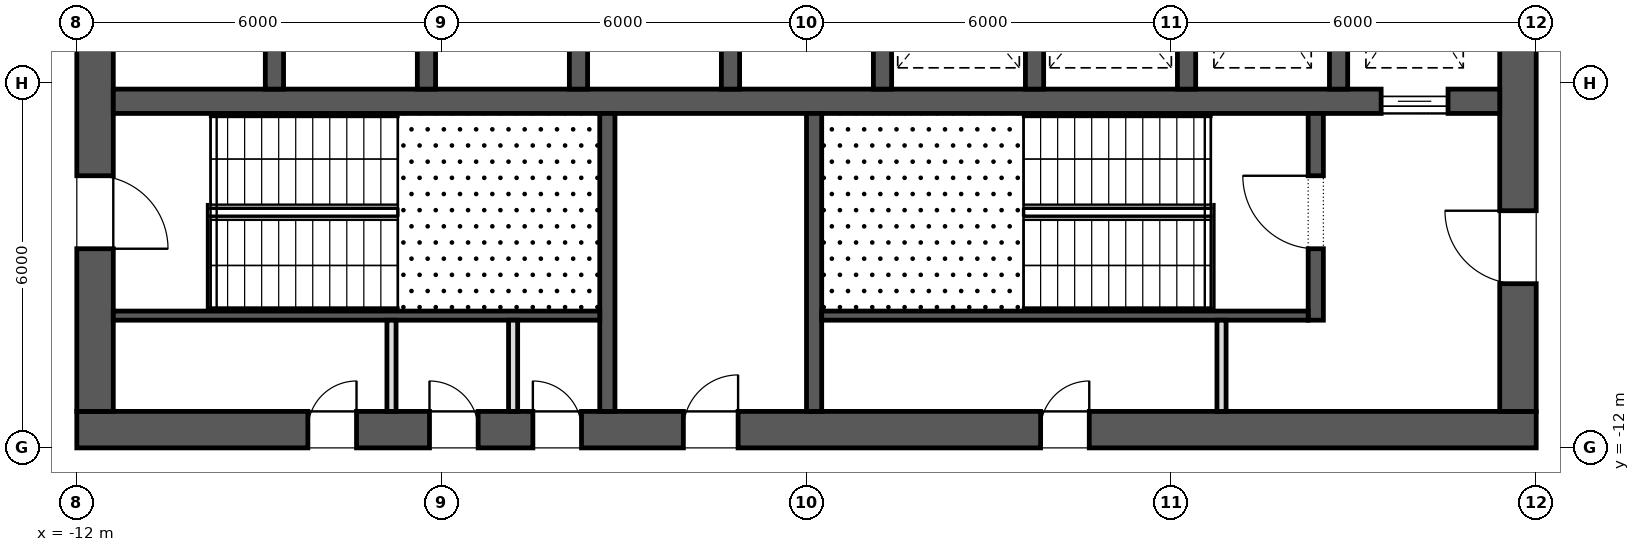
"""IFC4 building model, lengths in metres.
Left out: names, types, materials, properties, quantities, classifications, styles, units other than length and angle.
Written with IfcOpenShell. Run it as: python <this file> out.ifc"""

import sys

from ifc_helpers import new_model, si_unit, direction, frame, frame_2d, origin, place, context, subcontext, project, spatial, rectangle, extrude, element, fill, save


model = new_model("IFC4")
c1 = context("Model", 3, precision=1e-05, world=origin(), true_north=direction((0.0, 1.0)))
c2 = subcontext(c1, "Body", "Model", "MODEL_VIEW")
j1 = project(units=[si_unit("LENGTHUNIT", "METRE"), si_unit("PLANEANGLEUNIT", "RADIAN")], contexts=[c1])
p1 = place(None, origin())
s1 = spatial("IfcSite", under=j1, at=p1, CompositionType="ELEMENT")
p2 = place(p1, origin())
s2 = spatial("IfcBuilding", under=s1, at=p2, CompositionType="ELEMENT")
p3 = place(p2, frame((0.0, 0.0, 36.1)))
s3 = spatial("IfcBuildingStorey", under=s2, at=p3, CompositionType="ELEMENT", Elevation=36.1)
p4 = place(p3, frame((-12.0, -11.7, 0.0), z_axis=(0.0, 0.0, 1.0), x_axis=(1.0, 0.0, 0.0)))
e1 = element("IfcWall", 1, at=p4, inside=s3, PredefinedType="SHEAR", context=c2, shape_type="SweptSolid", body=[
    extrude(rectangle(XDim=24.0, YDim=0.6, at=frame_2d((12.0, 0.0))), origin(), (0.0, 0.0, 1.0), 4.2),
])
p5 = place(p4, frame((9.975, 0.0, 0.0)))
e2 = element("IfcOpeningElement", 2, at=p5, cuts=e1, PredefinedType="OPENING", context=c2, shape_type="SweptSolid", body=[
    extrude(rectangle(XDim=0.9, YDim=2.1, at=frame_2d((0.45, 1.05))), frame((0.0, 0.312, 0.0), z_axis=(0.0, -1.0, 0.0), x_axis=(1.0, 0.0, 0.0)), (0.0, 0.0, 1.0), 0.624),
])
p6 = place(p4, frame((3.8, 0.0, 0.0)))
e3 = element("IfcOpeningElement", 3, at=p6, cuts=e1, PredefinedType="OPENING", context=c2, shape_type="SweptSolid", body=[
    extrude(rectangle(XDim=0.8, YDim=2.1, at=frame_2d((0.4, 1.05))), frame((0.0, 0.312, 0.0), z_axis=(0.0, -1.0, 0.0), x_axis=(1.0, 0.0, 0.0)), (0.0, 0.0, 1.0), 0.624),
])
p7 = place(p4, frame((5.8, 0.0, 0.0)))
e4 = element("IfcOpeningElement", 4, at=p7, cuts=e1, PredefinedType="OPENING", context=c2, shape_type="SweptSolid", body=[
    extrude(rectangle(XDim=0.8, YDim=2.1, at=frame_2d((0.4, 1.05))), frame((0.0, 0.312, 0.0), z_axis=(0.0, -1.0, 0.0), x_axis=(1.0, 0.0, 0.0)), (0.0, 0.0, 1.0), 0.624),
])
p8 = place(p4, frame((7.5, 0.0, 0.0)))
e5 = element("IfcOpeningElement", 5, at=p8, cuts=e1, PredefinedType="OPENING", context=c2, shape_type="SweptSolid", body=[
    extrude(rectangle(XDim=0.8, YDim=2.1, at=frame_2d((0.4, 1.05))), frame((0.0, 0.312, 0.0), z_axis=(0.0, -1.0, 0.0), x_axis=(1.0, 0.0, 0.0)), (0.0, 0.0, 1.0), 0.624),
])
p9 = place(p4, frame((15.85, 0.0, 0.0)))
e6 = element("IfcOpeningElement", 6, at=p9, cuts=e1, PredefinedType="OPENING", context=c2, shape_type="SweptSolid", body=[
    extrude(rectangle(XDim=0.8, YDim=2.1, at=frame_2d((0.4, 1.05))), frame((0.0, 0.312, 0.0), z_axis=(0.0, -1.0, 0.0), x_axis=(1.0, 0.0, 0.0)), (0.0, 0.0, 1.0), 0.624),
])
p10 = place(p3, frame((11.7, -11.4, 0.0), z_axis=(0.0, 0.0, 1.0), x_axis=(0.0, 1.0, 0.0)))
e7 = element("IfcWall", 7, at=p10, inside=s3, PredefinedType="SHEAR", context=c2, shape_type="SweptSolid", body=[
    extrude(rectangle(XDim=22.8, YDim=0.6, at=frame_2d((11.4, 0.0))), origin(), (0.0, 0.0, 1.0), 4.2),
])
p11 = place(p10, frame((10.2, 0.0, 0.0)))
e8 = element("IfcOpeningElement", 8, at=p11, cuts=e7, PredefinedType="OPENING", context=c2, shape_type="SweptSolid", body=[
    extrude(rectangle(XDim=2.4, YDim=2.1, at=frame_2d((1.2, 1.05))), frame((0.0, 0.312, 0.0), z_axis=(0.0, -1.0, 0.0), x_axis=(1.0, 0.0, 0.0)), (0.0, 0.0, 1.0), 0.624),
])
p12 = place(p10, frame((19.5, 0.0, 0.0)))
e9 = element("IfcOpeningElement", 9, at=p12, cuts=e7, PredefinedType="OPENING", context=c2, shape_type="SweptSolid", body=[
    extrude(rectangle(XDim=1.2, YDim=2.1, at=frame_2d((0.6, 1.05))), frame((0.0, 0.312, 0.0), z_axis=(0.0, -1.0, 0.0), x_axis=(1.0, 0.0, 0.0)), (0.0, 0.0, 1.0), 0.624),
])
p13 = place(p10, frame((2.1, 0.0, 0.0)))
e10 = element("IfcOpeningElement", 10, at=p13, cuts=e7, PredefinedType="OPENING", context=c2, shape_type="SweptSolid", body=[
    extrude(rectangle(XDim=1.2, YDim=2.1, at=frame_2d((0.6, 1.05))), frame((0.0, 0.312, 0.0), z_axis=(0.0, -1.0, 0.0), x_axis=(1.0, 0.0, 0.0)), (0.0, 0.0, 1.0), 0.624),
])
p14 = place(p3, frame((-11.7, -11.4, 0.0), z_axis=(0.0, 0.0, 1.0), x_axis=(0.0, 1.0, 0.0)))
e11 = element("IfcWall", 11, at=p14, inside=s3, PredefinedType="SHEAR", context=c2, shape_type="SweptSolid", body=[
    extrude(rectangle(XDim=22.8, YDim=0.6, at=frame_2d((11.4, 0.0))), origin(), (0.0, 0.0, 1.0), 4.2),
])
p15 = place(p14, frame((10.2, 0.0, 0.0)))
e12 = element("IfcOpeningElement", 12, at=p15, cuts=e11, PredefinedType="OPENING", context=c2, shape_type="SweptSolid", body=[
    extrude(rectangle(XDim=2.4, YDim=2.1, at=frame_2d((1.2, 1.05))), frame((0.0, 0.312, 0.0), z_axis=(0.0, -1.0, 0.0), x_axis=(1.0, 0.0, 0.0)), (0.0, 0.0, 1.0), 0.624),
])
p16 = place(p14, frame((18.925, 0.0, 0.0)))
e13 = element("IfcOpeningElement", 13, at=p16, cuts=e11, PredefinedType="OPENING", context=c2, shape_type="SweptSolid", body=[
    extrude(rectangle(XDim=1.2, YDim=2.1, at=frame_2d((0.6, 1.05))), frame((0.0, 0.312, 0.0), z_axis=(0.0, -1.0, 0.0), x_axis=(1.0, 0.0, 0.0)), (0.0, 0.0, 1.0), 0.624),
])
p17 = place(p14, frame((2.675, 0.0, 0.0)))
e14 = element("IfcOpeningElement", 14, at=p17, cuts=e11, PredefinedType="OPENING", context=c2, shape_type="SweptSolid", body=[
    extrude(rectangle(XDim=1.2, YDim=2.1, at=frame_2d((0.6, 1.05))), frame((0.0, 0.312, 0.0), z_axis=(0.0, -1.0, 0.0), x_axis=(1.0, 0.0, 0.0)), (0.0, 0.0, 1.0), 0.624),
])
p18 = place(p3, frame((-11.4, -6.3, 0.0), z_axis=(0.0, 0.0, 1.0), x_axis=(1.0, 0.0, 0.0)))
e15 = element("IfcWall", 15, at=p18, inside=s3, PredefinedType="SHEAR", context=c2, shape_type="SweptSolid", body=[
    extrude(rectangle(XDim=22.8, YDim=0.4, at=frame_2d((11.4, 0.0))), origin(), (0.0, 0.0, 1.0), 4.2),
])
p19 = place(p18, frame((20.85, 0.0, 0.0)))
e16 = element("IfcOpeningElement", 16, at=p19, cuts=e15, PredefinedType="OPENING", context=c2, shape_type="SweptSolid", body=[
    extrude(rectangle(XDim=1.1, YDim=2.1, at=frame_2d((0.55, 1.05))), frame((0.0, 0.212, 0.0), z_axis=(0.0, -1.0, 0.0), x_axis=(1.0, 0.0, 0.0)), (0.0, 0.0, 1.0), 0.424),
])
for number, where, z_axis, x_axis in (
    (17, (-8.75, -6.1, 0.0), (0.0, 0.0, 1.0), (0.0, 1.0, 0.0)),
    (18, (-6.25, -6.1, 0.0), (0.0, 0.0, 1.0), (0.0, 1.0, 0.0)),
    (19, (-3.75, -6.1, 0.0), (0.0, 0.0, 1.0), (0.0, 1.0, 0.0)),
    (20, (-1.25, -6.1, 0.0), (0.0, 0.0, 1.0), (0.0, 1.0, 0.0)),
    (21, (1.25, -6.1, 0.0), (0.0, 0.0, 1.0), (0.0, 1.0, 0.0)),
    (22, (3.75, -6.1, 0.0), (0.0, 0.0, 1.0), (0.0, 1.0, 0.0)),
    (23, (6.25, -6.1, 0.0), (0.0, 0.0, 1.0), (0.0, 1.0, 0.0)),
    (24, (8.75, -6.1, 0.0), (0.0, 0.0, 1.0), (0.0, 1.0, 0.0)),
):
    element("IfcWall", number, at=place(p3, frame(where, z_axis=z_axis, x_axis=x_axis)), inside=s3, PredefinedType="SHEAR", context=c2, shape_type="SweptSolid", body=[
        extrude(rectangle(XDim=2.9, YDim=0.3, at=frame_2d((1.45, 0.0))), origin(), (0.0, 0.0, 1.0), 4.2),
    ])
for number, where, z_axis, x_axis in (
    (25, (-3.275, -11.4, 0.0), (0.0, 0.0, 1.0), (0.0, 1.0, 0.0)),
    (26, (0.125, -11.4, 0.0), (0.0, 0.0, 1.0), (0.0, 1.0, 0.0)),
):
    element("IfcWall", number, at=place(p3, frame(where, z_axis=z_axis, x_axis=x_axis)), inside=s3, PredefinedType="SHEAR", context=c2, shape_type="SweptSolid", body=[
        extrude(rectangle(XDim=4.9, YDim=0.25, at=frame_2d((2.45, 0.0))), origin(), (0.0, 0.0, 1.0), 3.9),
    ])
p20 = place(p3, frame((8.375, -9.9, 0.0), z_axis=(0.0, 0.0, 1.0), x_axis=(0.0, 1.0, 0.0)))
e27 = element("IfcWall", 27, at=p20, inside=s3, PredefinedType="SHEAR", context=c2, shape_type="SweptSolid", body=[
    extrude(rectangle(XDim=3.4, YDim=0.25, at=frame_2d((1.7, 0.0))), origin(), (0.0, 0.0, 1.0), 3.9),
])
p21 = place(p20, frame((1.175, 0.0, 0.0)))
e28 = element("IfcOpeningElement", 28, at=p21, cuts=e27, PredefinedType="OPENING", context=c2, shape_type="SweptSolid", body=[
    extrude(rectangle(XDim=1.2, YDim=2.1, at=frame_2d((0.6, 1.05))), frame((0.0, 0.137, 0.0), z_axis=(0.0, -1.0, 0.0), x_axis=(1.0, 0.0, 0.0)), (0.0, 0.0, 1.0), 0.274),
])
for number, where, z_axis, x_axis in (
    (29, (-11.4, -9.825, 0.0), (0.0, 0.0, 1.0), (1.0, 0.0, 0.0)),
    (30, (0.25, -9.825, 0.0), (0.0, 0.0, 1.0), (1.0, 0.0, 0.0)),
):
    element("IfcWall", number, at=place(p3, frame(where, z_axis=z_axis, x_axis=x_axis)), inside=s3, PredefinedType="SHEAR", context=c2, shape_type="SweptSolid", body=[
        extrude(rectangle(XDim=8.0, YDim=0.15, at=frame_2d((4.0, 0.0))), origin(), (0.0, 0.0, 1.0), 3.9),
    ])
for number, where, z_axis, x_axis in (
    (31, (-6.825, -11.4, 0.0), (0.0, 0.0, 1.0), (0.0, 1.0, 0.0)),
    (32, (-4.825, -11.4, 0.0), (0.0, 0.0, 1.0), (0.0, 1.0, 0.0)),
    (33, (6.825, -11.4, 0.0), (0.0, 0.0, 1.0), (0.0, 1.0, 0.0)),
):
    element("IfcWall", number, at=place(p3, frame(where, z_axis=z_axis, x_axis=x_axis)), inside=s3, PredefinedType="PARTITIONING", context=c2, shape_type="SweptSolid", body=[
        extrude(rectangle(XDim=1.5, YDim=0.15, at=frame_2d((0.75, 0.0))), origin(), (0.0, 0.0, 1.0), 3.9),
    ])
p22 = place(p19, origin())
e34 = element("IfcDoor", 34, at=p22, inside=s3, OperationType="SLIDING_TO_LEFT", PredefinedType="DOOR", context=c2, shape_type="SweptSolid", body=[
    extrude(rectangle(XDim=1.1, YDim=2.1, at=frame_2d((0.55, 1.05))), frame((0.0, 0.025, 0.0), z_axis=(0.0, -1.0, 0.0), x_axis=(1.0, 0.0, 0.0)), (0.0, 0.0, 1.0), 0.05),
])
fill(e16, e34)
p23 = place(p17, frame((1.2, 0.0, 0.0), z_axis=(0.0, 0.0, 1.0), x_axis=(-1.0, 0.0, 0.0)))
e35 = element("IfcDoor", 35, at=p23, inside=s3, OperationType="SINGLE_SWING_LEFT", PredefinedType="DOOR", context=c2, shape_type="SweptSolid", body=[
    extrude(rectangle(XDim=1.2, YDim=2.1, at=frame_2d((0.6, 1.05))), frame((0.0, 0.025, 0.0), z_axis=(0.0, -1.0, 0.0), x_axis=(1.0, 0.0, 0.0)), (0.0, 0.0, 1.0), 0.05),
])
fill(e14, e35)
p24 = place(p21, origin())
e36 = element("IfcDoor", 36, at=p24, inside=s3, OperationType="SINGLE_SWING_LEFT", PredefinedType="DOOR", context=c2, shape_type="SweptSolid", body=[
    extrude(rectangle(XDim=1.2, YDim=2.1, at=frame_2d((0.6, 1.05))), frame((0.0, 0.025, 0.0), z_axis=(0.0, -1.0, 0.0), x_axis=(1.0, 0.0, 0.0)), (0.0, 0.0, 1.0), 0.05),
])
fill(e28, e36)
p25 = place(p13, origin())
e37 = element("IfcDoor", 37, at=p25, inside=s3, OperationType="SINGLE_SWING_LEFT", PredefinedType="DOOR", context=c2, shape_type="SweptSolid", body=[
    extrude(rectangle(XDim=1.2, YDim=2.1, at=frame_2d((0.6, 1.05))), frame((0.0, 0.025, 0.0), z_axis=(0.0, -1.0, 0.0), x_axis=(1.0, 0.0, 0.0)), (0.0, 0.0, 1.0), 0.05),
])
fill(e10, e37)
p26 = place(p5, origin())
e38 = element("IfcDoor", 38, at=p26, inside=s3, OperationType="SINGLE_SWING_LEFT", PredefinedType="DOOR", context=c2, shape_type="SweptSolid", body=[
    extrude(rectangle(XDim=0.9, YDim=2.1, at=frame_2d((0.45, 1.05))), frame((0.0, 0.025, 0.0), z_axis=(0.0, -1.0, 0.0), x_axis=(1.0, 0.0, 0.0)), (0.0, 0.0, 1.0), 0.05),
])
fill(e2, e38)
p27 = place(p6, origin())
e39 = element("IfcDoor", 39, at=p27, inside=s3, OperationType="SINGLE_SWING_LEFT", PredefinedType="DOOR", context=c2, shape_type="SweptSolid", body=[
    extrude(rectangle(XDim=0.8, YDim=2.1, at=frame_2d((0.4, 1.05))), frame((0.0, 0.025, 0.0), z_axis=(0.0, -1.0, 0.0), x_axis=(1.0, 0.0, 0.0)), (0.0, 0.0, 1.0), 0.05),
])
fill(e3, e39)
p28 = place(p7, origin())
e40 = element("IfcDoor", 40, at=p28, inside=s3, OperationType="SINGLE_SWING_RIGHT", PredefinedType="DOOR", context=c2, shape_type="SweptSolid", body=[
    extrude(rectangle(XDim=0.8, YDim=2.1, at=frame_2d((0.4, 1.05))), frame((0.0, 0.025, 0.0), z_axis=(0.0, -1.0, 0.0), x_axis=(1.0, 0.0, 0.0)), (0.0, 0.0, 1.0), 0.05),
])
fill(e4, e40)
p29 = place(p8, origin())
e41 = element("IfcDoor", 41, at=p29, inside=s3, OperationType="SINGLE_SWING_RIGHT", PredefinedType="DOOR", context=c2, shape_type="SweptSolid", body=[
    extrude(rectangle(XDim=0.8, YDim=2.1, at=frame_2d((0.4, 1.05))), frame((0.0, 0.025, 0.0), z_axis=(0.0, -1.0, 0.0), x_axis=(1.0, 0.0, 0.0)), (0.0, 0.0, 1.0), 0.05),
])
fill(e5, e41)
p30 = place(p9, origin())
e42 = element("IfcDoor", 42, at=p30, inside=s3, OperationType="SINGLE_SWING_LEFT", PredefinedType="DOOR", context=c2, shape_type="SweptSolid", body=[
    extrude(rectangle(XDim=0.8, YDim=2.1, at=frame_2d((0.4, 1.05))), frame((0.0, 0.025, 0.0), z_axis=(0.0, -1.0, 0.0), x_axis=(1.0, 0.0, 0.0)), (0.0, 0.0, 1.0), 0.05),
])
fill(e6, e42)
save(model, sys.argv[1])
